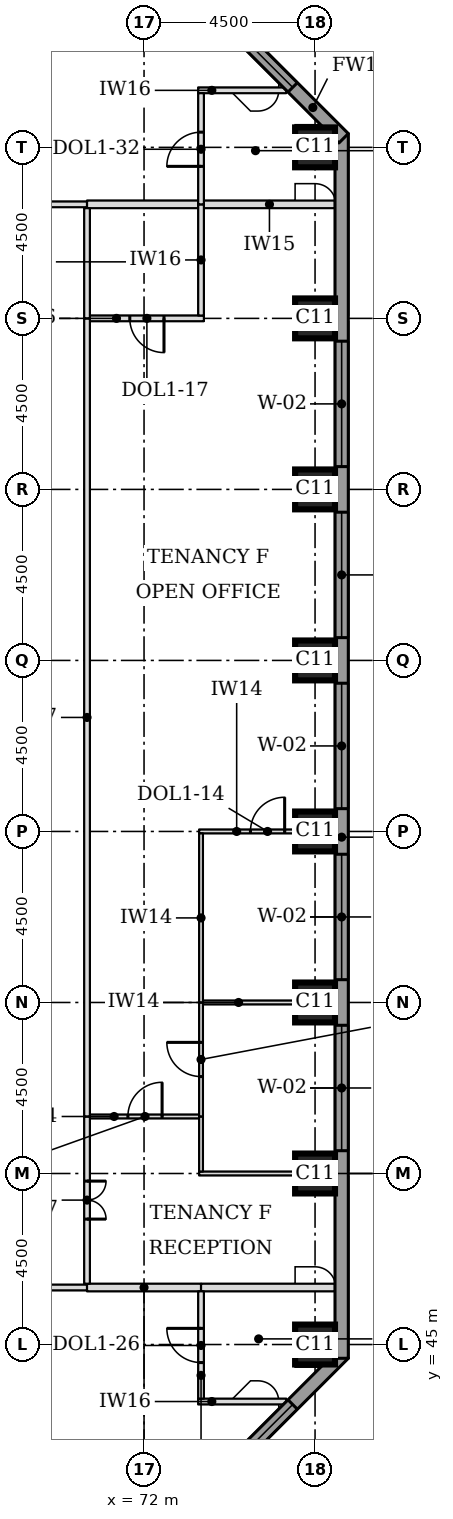
"""IFC4 building model, lengths in metres.
Left out: names, types, materials, properties, quantities, classifications, styles, units other than length and angle.
Written with IfcOpenShell. Run it as: python <this file> out.ifc"""

import sys

from ifc_helpers import new_model, si_unit, direction, frame, frame_2d, origin, origin_2d, place, context, subcontext, project, spatial, rectangle, extrude, element, fill, save


model = new_model("IFC4")
c1 = context("Model", 3, precision=1e-05, world=origin(), true_north=direction((0.0, 1.0)))
c2 = subcontext(c1, "Body", "Model", "MODEL_VIEW")
j1 = project(units=[si_unit("LENGTHUNIT", "METRE"), si_unit("PLANEANGLEUNIT", "RADIAN")], contexts=[c1])
p1 = place(None, origin())
s1 = spatial("IfcSite", under=j1, at=p1, CompositionType="ELEMENT")
p2 = place(p1, origin())
s2 = spatial("IfcBuilding", under=s1, at=p2, CompositionType="ELEMENT")
p3 = place(p2, frame((0.0, 0.0, 82.6)))
s3 = spatial("IfcBuildingStorey", under=s2, at=p3, CompositionType="ELEMENT", Elevation=82.6)
for number, where, z_axis, x_axis in (
    (1, (76.5, 45.0, 0.0), (0.0, 0.0, 1.0), (1.0, 0.0, 0.0)),
    (2, (76.5, 49.5, 0.0), (0.0, 0.0, 1.0), (1.0, 0.0, 0.0)),
    (3, (76.5, 54.0, 0.0), (0.0, 0.0, 1.0), (1.0, 0.0, 0.0)),
    (4, (76.5, 58.5, 0.0), (0.0, 0.0, 1.0), (1.0, 0.0, 0.0)),
    (5, (76.5, 63.0, 0.0), (0.0, 0.0, 1.0), (1.0, 0.0, 0.0)),
    (6, (76.5, 67.5, 0.0), (0.0, 0.0, 1.0), (1.0, 0.0, 0.0)),
    (7, (76.5, 72.0, 0.0), (0.0, 0.0, 1.0), (1.0, 0.0, 0.0)),
    (8, (76.5, 76.5, 0.0), (0.0, 0.0, 1.0), (1.0, 0.0, 0.0)),
):
    element("IfcColumn", number, at=place(p3, frame(where, z_axis=z_axis, x_axis=x_axis)), inside=s3, PredefinedType="COLUMN", context=c2, shape_type="SweptSolid", body=[
        extrude(rectangle(XDim=1.05, YDim=1.05, at=origin_2d()), origin(), (0.0, 0.0, 1.0), 3.7),
    ])
p4 = place(p3, frame((72.239, 39.749, 0.0), z_axis=(0.0, 0.0, 1.0), x_axis=(0.707106781187, 0.707106781187, 0.0)))
e9 = element("IfcWall", 9, at=p4, inside=s3, PredefinedType="STANDARD", context=c2, shape_type="SweptSolid", body=[
    extrude(rectangle(XDim=7.089, YDim=0.35, at=frame_2d((3.544, 0.0))), origin(), (0.0, 0.0, 1.0), 3.525),
])
p5 = place(p4, frame((1.894, 0.0, 0.9)))
e10 = element("IfcOpeningElement", 10, at=p5, cuts=e9, PredefinedType="OPENING", context=c2, shape_type="SweptSolid", body=[
    extrude(rectangle(XDim=3.3, YDim=1.9, at=frame_2d((1.65, 0.95))), frame((0.0, 0.185, 0.0), z_axis=(0.0, -1.0, 0.0), x_axis=(1.0, 0.0, 0.0)), (0.0, 0.0, 1.0), 0.37),
])
p6 = place(p3, frame((77.2, 44.638, 0.0), z_axis=(0.0, 0.0, 1.0), x_axis=(0.0, 1.0, 0.0)))
e11 = element("IfcWall", 11, at=p6, inside=s3, PredefinedType="STANDARD", context=c2, shape_type="SweptSolid", body=[
    extrude(rectangle(XDim=32.225, YDim=0.35, at=frame_2d((16.112, 0.0))), origin(), (0.0, 0.0, 1.0), 3.525),
])
p7 = place(p6, frame((5.462, 0.0, 0.9)))
e12 = element("IfcOpeningElement", 12, at=p7, cuts=e11, PredefinedType="OPENING", context=c2, shape_type="SweptSolid", body=[
    extrude(rectangle(XDim=3.3, YDim=1.9, at=frame_2d((1.65, 0.95))), frame((0.0, 0.185, 0.0), z_axis=(0.0, -1.0, 0.0), x_axis=(1.0, 0.0, 0.0)), (0.0, 0.0, 1.0), 0.37),
])
p8 = place(p6, frame((9.962, 0.0, 0.9)))
e13 = element("IfcOpeningElement", 13, at=p8, cuts=e11, PredefinedType="OPENING", context=c2, shape_type="SweptSolid", body=[
    extrude(rectangle(XDim=3.3, YDim=1.9, at=frame_2d((1.65, 0.95))), frame((0.0, 0.185, 0.0), z_axis=(0.0, -1.0, 0.0), x_axis=(1.0, 0.0, 0.0)), (0.0, 0.0, 1.0), 0.37),
])
p9 = place(p6, frame((14.462, 0.0, 0.9)))
e14 = element("IfcOpeningElement", 14, at=p9, cuts=e11, PredefinedType="OPENING", context=c2, shape_type="SweptSolid", body=[
    extrude(rectangle(XDim=3.3, YDim=1.9, at=frame_2d((1.65, 0.95))), frame((0.0, 0.185, 0.0), z_axis=(0.0, -1.0, 0.0), x_axis=(1.0, 0.0, 0.0)), (0.0, 0.0, 1.0), 0.37),
])
p10 = place(p6, frame((18.962, 0.0, 0.9)))
e15 = element("IfcOpeningElement", 15, at=p10, cuts=e11, PredefinedType="OPENING", context=c2, shape_type="SweptSolid", body=[
    extrude(rectangle(XDim=3.3, YDim=1.9, at=frame_2d((1.65, 0.95))), frame((0.0, 0.185, 0.0), z_axis=(0.0, -1.0, 0.0), x_axis=(1.0, 0.0, 0.0)), (0.0, 0.0, 1.0), 0.37),
])
p11 = place(p6, frame((23.462, 0.0, 0.9)))
e16 = element("IfcOpeningElement", 16, at=p11, cuts=e11, PredefinedType="OPENING", context=c2, shape_type="SweptSolid", body=[
    extrude(rectangle(XDim=3.3, YDim=1.9, at=frame_2d((1.65, 0.95))), frame((0.0, 0.185, 0.0), z_axis=(0.0, -1.0, 0.0), x_axis=(1.0, 0.0, 0.0)), (0.0, 0.0, 1.0), 0.37),
])
p12 = place(p3, frame((77.251, 76.739, 0.0), z_axis=(0.0, 0.0, 1.0), x_axis=(-0.707106781187, 0.707106781187, 0.0)))
e17 = element("IfcWall", 17, at=p12, inside=s3, PredefinedType="STANDARD", context=c2, shape_type="SweptSolid", body=[
    extrude(rectangle(XDim=7.089, YDim=0.35, at=frame_2d((3.544, 0.0))), origin(), (0.0, 0.0, 1.0), 3.525),
])
p13 = place(p12, frame((1.894, 0.0, 0.9)))
e18 = element("IfcOpeningElement", 18, at=p13, cuts=e17, PredefinedType="OPENING", context=c2, shape_type="SweptSolid", body=[
    extrude(rectangle(XDim=3.3, YDim=1.9, at=frame_2d((1.65, 0.95))), frame((0.0, 0.185, 0.0), z_axis=(0.0, -1.0, 0.0), x_axis=(1.0, 0.0, 0.0)), (0.0, 0.0, 1.0), 0.37),
])
p14 = place(p3, frame((73.425, 43.5, 0.0), z_axis=(0.0, 0.0, 1.0), x_axis=(1.0, 0.0, 0.0)))
e19 = element("IfcWall", 19, at=p14, inside=s3, PredefinedType="PARTITIONING", context=c2, shape_type="SweptSolid", body=[
    extrude(rectangle(XDim=2.317, YDim=0.15, at=frame_2d((1.159, 0.0))), origin(), (0.0, 0.0, 1.0), 3.55),
])
p15 = place(p3, frame((54.0, 46.5, 0.0), z_axis=(0.0, 0.0, 1.0), x_axis=(1.0, 0.0, 0.0)))
e20 = element("IfcWall", 20, at=p15, inside=s3, PredefinedType="PARTITIONING", context=c2, shape_type="SweptSolid", body=[
    extrude(rectangle(XDim=16.5, YDim=0.15, at=frame_2d((8.25, 0.0))), origin(), (0.0, 0.0, 1.0), 3.55),
])
p16 = place(p3, frame((70.5, 46.5, 0.0), z_axis=(0.0, 0.0, 1.0), x_axis=(1.0, 0.0, 0.0)))
e21 = element("IfcWall", 21, at=p16, inside=s3, PredefinedType="PARTITIONING", context=c2, shape_type="SweptSolid", body=[
    extrude(rectangle(XDim=3.0, YDim=0.2, at=frame_2d((1.5, 0.0))), origin(), (0.0, 0.0, 1.0), 3.55),
])
p17 = place(p3, frame((73.5, 46.5, 0.0), z_axis=(0.0, 0.0, 1.0), x_axis=(1.0, 0.0, 0.0)))
e22 = element("IfcWall", 22, at=p17, inside=s3, PredefinedType="PARTITIONING", context=c2, shape_type="SweptSolid", body=[
    extrude(rectangle(XDim=3.525, YDim=0.2, at=frame_2d((1.762, 0.0))), origin(), (0.0, 0.0, 1.0), 3.55),
])
p18 = place(p3, frame((73.45, 49.5, 0.0), z_axis=(0.0, 0.0, 1.0), x_axis=(1.0, 0.0, 0.0)))
e23 = element("IfcWall", 23, at=p18, inside=s3, PredefinedType="PARTITIONING", context=c2, shape_type="SweptSolid", body=[
    extrude(rectangle(XDim=3.575, YDim=0.1, at=frame_2d((1.788, 0.0))), origin(), (0.0, 0.0, 1.0), 3.55),
])
p19 = place(p3, frame((70.575, 51.0, 0.0), z_axis=(0.0, 0.0, 1.0), x_axis=(1.0, 0.0, 0.0)))
e24 = element("IfcWall", 24, at=p19, inside=s3, PredefinedType="PARTITIONING", context=c2, shape_type="SweptSolid", body=[
    extrude(rectangle(XDim=2.875, YDim=0.1, at=frame_2d((1.438, 0.0))), origin(), (0.0, 0.0, 1.0), 3.022),
])
p20 = place(p19, frame((1.0, 0.0, 0.0)))
e25 = element("IfcOpeningElement", 25, at=p20, cuts=e24, PredefinedType="OPENING", context=c2, shape_type="SweptSolid", body=[
    extrude(rectangle(XDim=0.9, YDim=2.1, at=frame_2d((0.45, 1.05))), frame((0.0, 0.06, 0.0), z_axis=(0.0, -1.0, 0.0), x_axis=(1.0, 0.0, 0.0)), (0.0, 0.0, 1.0), 0.12),
])
p21 = place(p3, frame((73.55, 54.0, 0.0), z_axis=(0.0, 0.0, 1.0), x_axis=(1.0, 0.0, 0.0)))
e26 = element("IfcWall", 26, at=p21, inside=s3, PredefinedType="PARTITIONING", context=c2, shape_type="SweptSolid", body=[
    extrude(rectangle(XDim=3.475, YDim=0.1, at=frame_2d((1.737, 0.0))), origin(), (0.0, 0.0, 1.0), 3.55),
])
p22 = place(p3, frame((73.45, 58.5, 0.0), z_axis=(0.0, 0.0, 1.0), x_axis=(1.0, 0.0, 0.0)))
e27 = element("IfcWall", 27, at=p22, inside=s3, PredefinedType="PARTITIONING", context=c2, shape_type="SweptSolid", body=[
    extrude(rectangle(XDim=3.575, YDim=0.1, at=frame_2d((1.788, 0.0))), origin(), (0.0, 0.0, 1.0), 3.55),
])
p23 = place(p22, frame((1.35, 0.0, 0.0)))
e28 = element("IfcOpeningElement", 28, at=p23, cuts=e27, PredefinedType="OPENING", context=c2, shape_type="SweptSolid", body=[
    extrude(rectangle(XDim=0.9, YDim=2.1, at=frame_2d((0.45, 1.05))), frame((0.0, 0.06, 0.0), z_axis=(0.0, -1.0, 0.0), x_axis=(1.0, 0.0, 0.0)), (0.0, 0.0, 1.0), 0.12),
])
p24 = place(p3, frame((70.575, 72.0, 0.0), z_axis=(0.0, 0.0, 1.0), x_axis=(1.0, 0.0, 0.0)))
e29 = element("IfcWall", 29, at=p24, inside=s3, PredefinedType="PARTITIONING", context=c2, shape_type="SweptSolid", body=[
    extrude(rectangle(XDim=3.0, YDim=0.15, at=frame_2d((1.5, 0.0))), origin(), (0.0, 0.0, 1.0), 3.55),
])
p25 = place(p24, frame((1.05, 0.0, 0.0)))
e30 = element("IfcOpeningElement", 30, at=p25, cuts=e29, PredefinedType="OPENING", context=c2, shape_type="SweptSolid", body=[
    extrude(rectangle(XDim=0.9, YDim=2.1, at=frame_2d((0.45, 1.05))), frame((0.0, 0.085, 0.0), z_axis=(0.0, -1.0, 0.0), x_axis=(1.0, 0.0, 0.0)), (0.0, 0.0, 1.0), 0.17),
])
p26 = place(p3, frame((46.5, 75.0, 0.0), z_axis=(0.0, 0.0, 1.0), x_axis=(1.0, 0.0, 0.0)))
e31 = element("IfcWall", 31, at=p26, inside=s3, PredefinedType="PARTITIONING", context=c2, shape_type="SweptSolid", body=[
    extrude(rectangle(XDim=24.0, YDim=0.15, at=frame_2d((12.0, 0.0))), origin(), (0.0, 0.0, 1.0), 3.55),
])
p27 = place(p3, frame((70.5, 75.0, 0.0), z_axis=(0.0, 0.0, 1.0), x_axis=(1.0, 0.0, 0.0)))
e32 = element("IfcWall", 32, at=p27, inside=s3, PredefinedType="PARTITIONING", context=c2, shape_type="SweptSolid", body=[
    extrude(rectangle(XDim=2.925, YDim=0.2, at=frame_2d((1.462, 0.0))), origin(), (0.0, 0.0, 1.0), 3.55),
])
p28 = place(p3, frame((73.575, 75.0, 0.0), z_axis=(0.0, 0.0, 1.0), x_axis=(1.0, 0.0, 0.0)))
e33 = element("IfcWall", 33, at=p28, inside=s3, PredefinedType="PARTITIONING", context=c2, shape_type="SweptSolid", body=[
    extrude(rectangle(XDim=3.45, YDim=0.2, at=frame_2d((1.725, 0.0))), origin(), (0.0, 0.0, 1.0), 3.55),
])
p29 = place(p3, frame((73.425, 78.0, 0.0), z_axis=(0.0, 0.0, 1.0), x_axis=(1.0, 0.0, 0.0)))
e34 = element("IfcWall", 34, at=p29, inside=s3, PredefinedType="PARTITIONING", context=c2, shape_type="SweptSolid", body=[
    extrude(rectangle(XDim=2.317, YDim=0.15, at=frame_2d((1.159, 0.0))), origin(), (0.0, 0.0, 1.0), 3.55),
])
p30 = place(p3, frame((73.5, 43.575, 0.0), z_axis=(0.0, 0.0, 1.0), x_axis=(0.0, 1.0, 0.0)))
e35 = element("IfcWall", 35, at=p30, inside=s3, PredefinedType="PARTITIONING", context=c2, shape_type="SweptSolid", body=[
    extrude(rectangle(XDim=2.825, YDim=0.15, at=frame_2d((1.413, 0.0))), origin(), (0.0, 0.0, 1.0), 3.55),
])
p31 = place(p30, frame((0.95, 0.0, 0.0)))
e36 = element("IfcOpeningElement", 36, at=p31, cuts=e35, PredefinedType="OPENING", context=c2, shape_type="SweptSolid", body=[
    extrude(rectangle(XDim=0.9, YDim=2.1, at=frame_2d((0.45, 1.05))), frame((0.0, 0.085, 0.0), z_axis=(0.0, -1.0, 0.0), x_axis=(1.0, 0.0, 0.0)), (0.0, 0.0, 1.0), 0.17),
])
p32 = place(p3, frame((70.5, 46.6, 0.0), z_axis=(0.0, 0.0, 1.0), x_axis=(0.0, 1.0, 0.0)))
e37 = element("IfcWall", 37, at=p32, inside=s3, PredefinedType="PARTITIONING", context=c2, shape_type="SweptSolid", body=[
    extrude(rectangle(XDim=4.4, YDim=0.15, at=frame_2d((2.2, 0.0))), origin(), (0.0, 0.0, 1.0), 3.55),
])
p33 = place(p32, frame((1.7, 0.0, 0.0)))
e38 = element("IfcOpeningElement", 38, at=p33, cuts=e37, PredefinedType="OPENING", context=c2, shape_type="SweptSolid", body=[
    extrude(rectangle(XDim=1.0, YDim=2.1, at=frame_2d((0.5, 1.05))), frame((0.0, 0.085, 0.0), z_axis=(0.0, -1.0, 0.0), x_axis=(1.0, 0.0, 0.0)), (0.0, 0.0, 1.0), 0.17),
])
p34 = place(p3, frame((73.5, 49.55, 0.0), z_axis=(0.0, 0.0, 1.0), x_axis=(0.0, 1.0, 0.0)))
e39 = element("IfcWall", 39, at=p34, inside=s3, PredefinedType="PARTITIONING", context=c2, shape_type="SweptSolid", body=[
    extrude(rectangle(XDim=1.45, YDim=0.1, at=frame_2d((0.725, 0.0))), origin(), (0.0, 0.0, 1.0), 3.55),
])
p35 = place(p3, frame((70.5, 51.0, 0.0), z_axis=(0.0, 0.0, 1.0), x_axis=(0.0, 1.0, 0.0)))
e40 = element("IfcWall", 40, at=p35, inside=s3, PredefinedType="PARTITIONING", context=c2, shape_type="SweptSolid", body=[
    extrude(rectangle(XDim=21.0, YDim=0.15, at=frame_2d((10.5, 0.0))), origin(), (0.0, 0.0, 1.0), 3.55),
])
p36 = place(p3, frame((73.5, 51.0, 0.0), z_axis=(0.0, 0.0, 1.0), x_axis=(0.0, 1.0, 0.0)))
e41 = element("IfcWall", 41, at=p36, inside=s3, PredefinedType="PARTITIONING", context=c2, shape_type="SweptSolid", body=[
    extrude(rectangle(XDim=3.0, YDim=0.1, at=frame_2d((1.5, 0.0))), origin(), (0.0, 0.0, 1.0), 3.55),
])
p37 = place(p36, frame((1.05, 0.0, 0.0)))
e42 = element("IfcOpeningElement", 42, at=p37, cuts=e41, PredefinedType="OPENING", context=c2, shape_type="SweptSolid", body=[
    extrude(rectangle(XDim=0.9, YDim=2.1, at=frame_2d((0.45, 1.05))), frame((0.0, 0.06, 0.0), z_axis=(0.0, -1.0, 0.0), x_axis=(1.0, 0.0, 0.0)), (0.0, 0.0, 1.0), 0.12),
])
p38 = place(p3, frame((73.5, 54.0, 0.0), z_axis=(0.0, 0.0, 1.0), x_axis=(0.0, 1.0, 0.0)))
e43 = element("IfcWall", 43, at=p38, inside=s3, PredefinedType="PARTITIONING", context=c2, shape_type="SweptSolid", body=[
    extrude(rectangle(XDim=4.45, YDim=0.1, at=frame_2d((2.225, 0.0))), origin(), (0.0, 0.0, 1.0), 3.55),
])
p39 = place(p3, frame((70.5, 72.0, 0.0), z_axis=(0.0, 0.0, 1.0), x_axis=(0.0, 1.0, 0.0)))
e44 = element("IfcWall", 44, at=p39, inside=s3, PredefinedType="PARTITIONING", context=c2, shape_type="SweptSolid", body=[
    extrude(rectangle(XDim=2.9, YDim=0.15, at=frame_2d((1.45, 0.0))), origin(), (0.0, 0.0, 1.0), 3.55),
])
p40 = place(p3, frame((73.5, 72.075, 0.0), z_axis=(0.0, 0.0, 1.0), x_axis=(0.0, 1.0, 0.0)))
e45 = element("IfcWall", 45, at=p40, inside=s3, PredefinedType="PARTITIONING", context=c2, shape_type="SweptSolid", body=[
    extrude(rectangle(XDim=2.925, YDim=0.15, at=frame_2d((1.462, 0.0))), origin(), (0.0, 0.0, 1.0), 3.55),
])
p41 = place(p3, frame((73.5, 75.0, 0.0), z_axis=(0.0, 0.0, 1.0), x_axis=(0.0, 1.0, 0.0)))
e46 = element("IfcWall", 46, at=p41, inside=s3, PredefinedType="PARTITIONING", context=c2, shape_type="SweptSolid", body=[
    extrude(rectangle(XDim=2.925, YDim=0.15, at=frame_2d((1.462, 0.0))), origin(), (0.0, 0.0, 1.0), 3.55),
])
p42 = place(p41, frame((1.0, 0.0, 0.0)))
e47 = element("IfcOpeningElement", 47, at=p42, cuts=e46, PredefinedType="OPENING", context=c2, shape_type="SweptSolid", body=[
    extrude(rectangle(XDim=0.9, YDim=2.1, at=frame_2d((0.45, 1.05))), frame((0.0, 0.085, 0.0), z_axis=(0.0, -1.0, 0.0), x_axis=(1.0, 0.0, 0.0)), (0.0, 0.0, 1.0), 0.17),
])
p43 = place(p5, origin())
e48 = element("IfcWindow", 48, at=p43, inside=s3, PartitioningType="SINGLE_PANEL", PredefinedType="WINDOW", context=c2, shape_type="SweptSolid", body=[
    extrude(rectangle(XDim=3.3, YDim=1.9, at=frame_2d((1.65, 0.95))), frame((0.0, 0.085, 0.0), z_axis=(0.0, -1.0, 0.0), x_axis=(1.0, 0.0, 0.0)), (0.0, 0.0, 1.0), 0.06),
])
fill(e10, e48)
p44 = place(p7, origin())
e49 = element("IfcWindow", 49, at=p44, inside=s3, PartitioningType="SINGLE_PANEL", PredefinedType="WINDOW", context=c2, shape_type="SweptSolid", body=[
    extrude(rectangle(XDim=3.3, YDim=1.9, at=frame_2d((1.65, 0.95))), frame((0.0, 0.085, 0.0), z_axis=(0.0, -1.0, 0.0), x_axis=(1.0, 0.0, 0.0)), (0.0, 0.0, 1.0), 0.06),
])
fill(e12, e49)
p45 = place(p8, origin())
e50 = element("IfcWindow", 50, at=p45, inside=s3, PartitioningType="SINGLE_PANEL", PredefinedType="WINDOW", context=c2, shape_type="SweptSolid", body=[
    extrude(rectangle(XDim=3.3, YDim=1.9, at=frame_2d((1.65, 0.95))), frame((0.0, 0.085, 0.0), z_axis=(0.0, -1.0, 0.0), x_axis=(1.0, 0.0, 0.0)), (0.0, 0.0, 1.0), 0.06),
])
fill(e13, e50)
p46 = place(p9, origin())
e51 = element("IfcWindow", 51, at=p46, inside=s3, PartitioningType="SINGLE_PANEL", PredefinedType="WINDOW", context=c2, shape_type="SweptSolid", body=[
    extrude(rectangle(XDim=3.3, YDim=1.9, at=frame_2d((1.65, 0.95))), frame((0.0, 0.085, 0.0), z_axis=(0.0, -1.0, 0.0), x_axis=(1.0, 0.0, 0.0)), (0.0, 0.0, 1.0), 0.06),
])
fill(e14, e51)
p47 = place(p10, origin())
e52 = element("IfcWindow", 52, at=p47, inside=s3, PartitioningType="SINGLE_PANEL", PredefinedType="WINDOW", context=c2, shape_type="SweptSolid", body=[
    extrude(rectangle(XDim=3.3, YDim=1.9, at=frame_2d((1.65, 0.95))), frame((0.0, 0.085, 0.0), z_axis=(0.0, -1.0, 0.0), x_axis=(1.0, 0.0, 0.0)), (0.0, 0.0, 1.0), 0.06),
])
fill(e15, e52)
p48 = place(p11, origin())
e53 = element("IfcWindow", 53, at=p48, inside=s3, PartitioningType="SINGLE_PANEL", PredefinedType="WINDOW", context=c2, shape_type="SweptSolid", body=[
    extrude(rectangle(XDim=3.3, YDim=1.9, at=frame_2d((1.65, 0.95))), frame((0.0, 0.085, 0.0), z_axis=(0.0, -1.0, 0.0), x_axis=(1.0, 0.0, 0.0)), (0.0, 0.0, 1.0), 0.06),
])
fill(e16, e53)
p49 = place(p13, origin())
e54 = element("IfcWindow", 54, at=p49, inside=s3, PartitioningType="SINGLE_PANEL", PredefinedType="WINDOW", context=c2, shape_type="SweptSolid", body=[
    extrude(rectangle(XDim=3.3, YDim=1.9, at=frame_2d((1.65, 0.95))), frame((0.0, 0.085, 0.0), z_axis=(0.0, -1.0, 0.0), x_axis=(1.0, 0.0, 0.0)), (0.0, 0.0, 1.0), 0.06),
])
fill(e18, e54)
p50 = place(p31, origin())
e55 = element("IfcDoor", 55, at=p50, inside=s3, OperationType="SINGLE_SWING_RIGHT", PredefinedType="DOOR", context=c2, shape_type="SweptSolid", body=[
    extrude(rectangle(XDim=0.9, YDim=2.1, at=frame_2d((0.45, 1.05))), frame((0.0, 0.025, 0.0), z_axis=(0.0, -1.0, 0.0), x_axis=(1.0, 0.0, 0.0)), (0.0, 0.0, 1.0), 0.05),
])
fill(e36, e55)
p51 = place(p33, frame((1.0, 0.0, 0.0), z_axis=(0.0, 0.0, 1.0), x_axis=(-1.0, 0.0, 0.0)))
e56 = element("IfcDoor", 56, at=p51, inside=s3, OperationType="DOUBLE_DOOR_SINGLE_SWING", PredefinedType="DOOR", context=c2, shape_type="SweptSolid", body=[
    extrude(rectangle(XDim=1.0, YDim=2.1, at=frame_2d((0.5, 1.05))), frame((0.0, 0.025, 0.0), z_axis=(0.0, -1.0, 0.0), x_axis=(1.0, 0.0, 0.0)), (0.0, 0.0, 1.0), 0.05),
])
fill(e38, e56)
p52 = place(p20, origin())
e57 = element("IfcDoor", 57, at=p52, inside=s3, OperationType="SINGLE_SWING_RIGHT", PredefinedType="DOOR", context=c2, shape_type="SweptSolid", body=[
    extrude(rectangle(XDim=0.9, YDim=2.1, at=frame_2d((0.45, 1.05))), frame((0.0, 0.025, 0.0), z_axis=(0.0, -1.0, 0.0), x_axis=(1.0, 0.0, 0.0)), (0.0, 0.0, 1.0), 0.05),
])
fill(e25, e57)
p53 = place(p37, origin())
e58 = element("IfcDoor", 58, at=p53, inside=s3, OperationType="SINGLE_SWING_RIGHT", PredefinedType="DOOR", context=c2, shape_type="SweptSolid", body=[
    extrude(rectangle(XDim=0.9, YDim=2.1, at=frame_2d((0.45, 1.05))), frame((0.0, 0.025, 0.0), z_axis=(0.0, -1.0, 0.0), x_axis=(1.0, 0.0, 0.0)), (0.0, 0.0, 1.0), 0.05),
])
fill(e42, e58)
p54 = place(p23, origin())
e59 = element("IfcDoor", 59, at=p54, inside=s3, OperationType="SINGLE_SWING_RIGHT", PredefinedType="DOOR", context=c2, shape_type="SweptSolid", body=[
    extrude(rectangle(XDim=0.9, YDim=2.1, at=frame_2d((0.45, 1.05))), frame((0.0, 0.025, 0.0), z_axis=(0.0, -1.0, 0.0), x_axis=(1.0, 0.0, 0.0)), (0.0, 0.0, 1.0), 0.05),
])
fill(e28, e59)
p55 = place(p25, frame((0.9, 0.0, 0.0), z_axis=(0.0, 0.0, 1.0), x_axis=(-1.0, 0.0, 0.0)))
e60 = element("IfcDoor", 60, at=p55, inside=s3, OperationType="SINGLE_SWING_LEFT", PredefinedType="DOOR", context=c2, shape_type="SweptSolid", body=[
    extrude(rectangle(XDim=0.9, YDim=2.1, at=frame_2d((0.45, 1.05))), frame((0.0, 0.025, 0.0), z_axis=(0.0, -1.0, 0.0), x_axis=(1.0, 0.0, 0.0)), (0.0, 0.0, 1.0), 0.05),
])
fill(e30, e60)
p56 = place(p42, origin())
e61 = element("IfcDoor", 61, at=p56, inside=s3, OperationType="SINGLE_SWING_LEFT", PredefinedType="DOOR", context=c2, shape_type="SweptSolid", body=[
    extrude(rectangle(XDim=0.9, YDim=2.1, at=frame_2d((0.45, 1.05))), frame((0.0, 0.025, 0.0), z_axis=(0.0, -1.0, 0.0), x_axis=(1.0, 0.0, 0.0)), (0.0, 0.0, 1.0), 0.05),
])
fill(e47, e61)
save(model, sys.argv[1])
